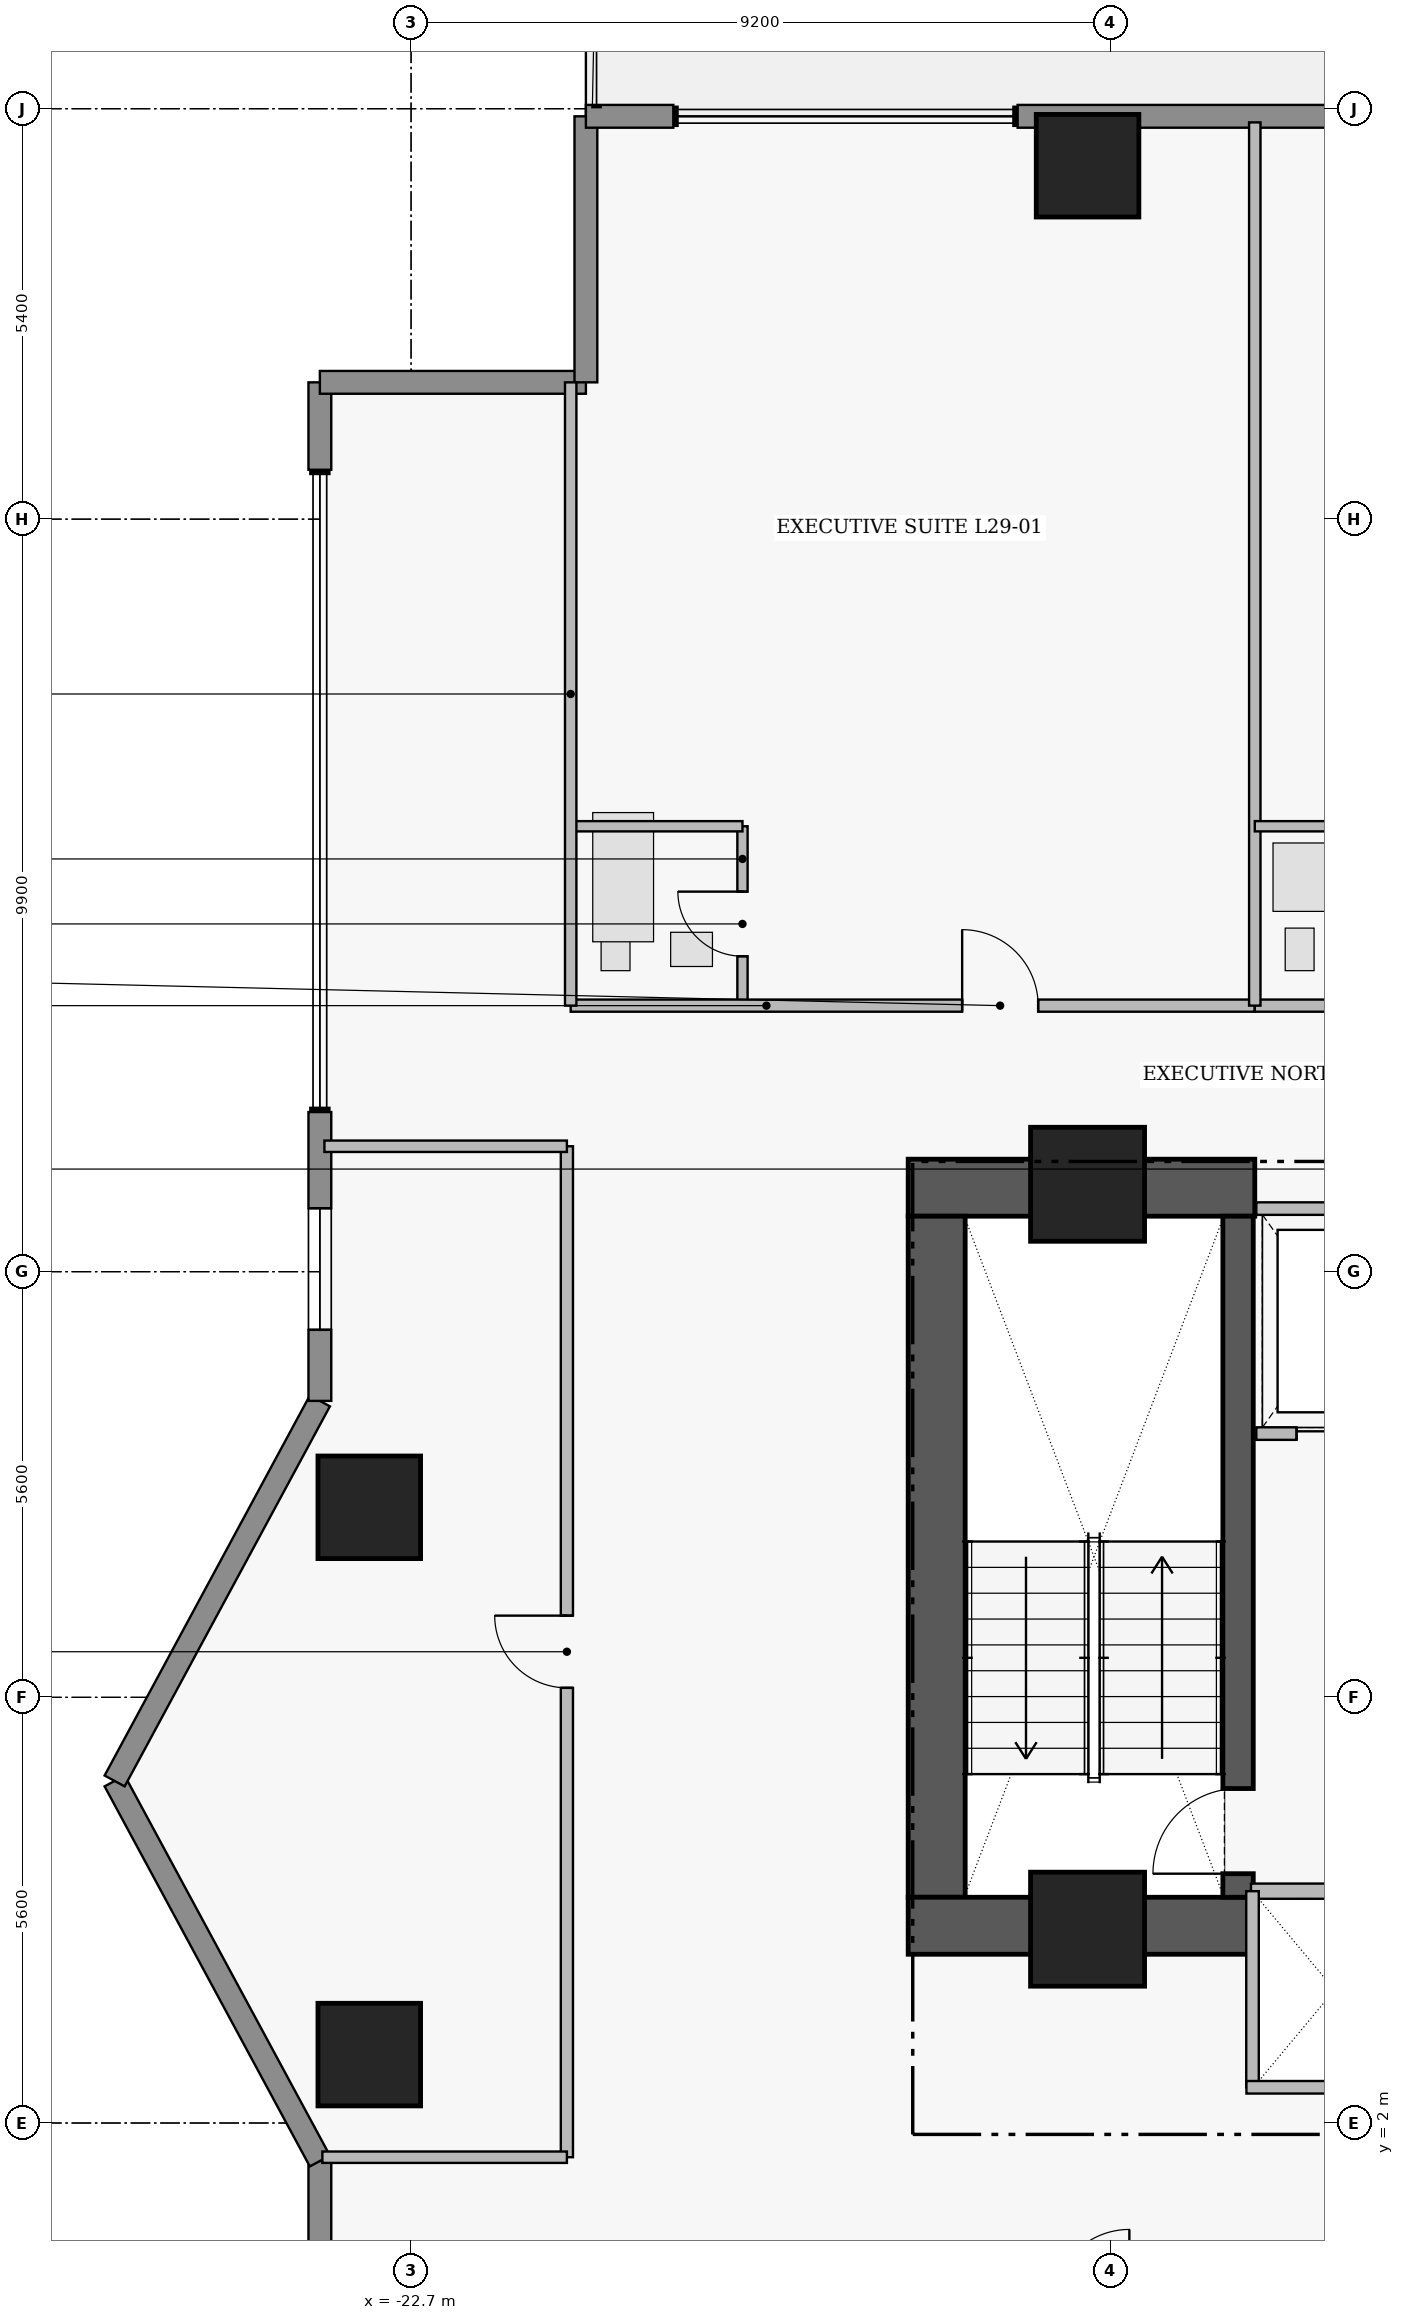
"""IFC4 building model, lengths in metres.
Left out: names, types, materials, properties, quantities, classifications, styles, units other than length and angle.
Written with IfcOpenShell. Run it as: python <this file> out.ifc"""

import sys

from ifc_helpers import new_model, si_unit, direction, frame, frame_2d, origin, origin_2d, place, context, subcontext, project, spatial, rectangle, extrude, element, fill, save


model = new_model("IFC4")
c1 = context("Model", 3, precision=1e-05, world=origin(), true_north=direction((0.0, 1.0)))
c2 = subcontext(c1, "Body", "Model", "MODEL_VIEW")
j1 = project(units=[si_unit("LENGTHUNIT", "METRE"), si_unit("PLANEANGLEUNIT", "RADIAN")], contexts=[c1])
p1 = place(None, origin())
s1 = spatial("IfcSite", under=j1, at=p1, CompositionType="ELEMENT")
p2 = place(p1, origin())
s2 = spatial("IfcBuilding", under=s1, at=p2, CompositionType="ELEMENT")
p3 = place(p2, frame((0.0, 0.0, 117.55)))
s3 = spatial("IfcBuildingStorey", under=s2, at=p3, CompositionType="ELEMENT", Elevation=117.55)
p4 = place(p3, frame((-16.16, 14.305, 0.0), z_axis=(0.0, 0.0, 1.0), x_axis=(1.0, 0.0, 0.0)))
e1 = element("IfcWall", 1, at=p4, inside=s3, PredefinedType="SHEAR", context=c2, shape_type="SweptSolid", body=[
    extrude(rectangle(XDim=4.56, YDim=0.75, at=frame_2d((2.28, 0.0))), origin(), (0.0, 0.0, 1.0), 3.46),
])
p5 = place(p3, frame((-15.785, 4.97, 0.0), z_axis=(0.0, 0.0, 1.0), x_axis=(0.0, 1.0, 0.0)))
e2 = element("IfcWall", 2, at=p5, inside=s3, PredefinedType="SHEAR", context=c2, shape_type="SweptSolid", body=[
    extrude(rectangle(XDim=8.96, YDim=0.75, at=frame_2d((4.48, 0.0))), origin(), (0.0, 0.0, 1.0), 3.46),
])
p6 = place(p3, frame((-16.16, 4.595, 0.0), z_axis=(0.0, 0.0, 1.0), x_axis=(1.0, 0.0, 0.0)))
e3 = element("IfcWall", 3, at=p6, inside=s3, PredefinedType="SHEAR", context=c2, shape_type="SweptSolid", body=[
    extrude(rectangle(XDim=4.56, YDim=0.75, at=frame_2d((2.28, 0.0))), origin(), (0.0, 0.0, 1.0), 3.46),
])
p7 = place(p3, frame((-11.82, 4.97, 0.0), z_axis=(0.0, 0.0, 1.0), x_axis=(0.0, 1.0, 0.0)))
e4 = element("IfcWall", 4, at=p7, inside=s3, PredefinedType="SHEAR", context=c2, shape_type="SweptSolid", body=[
    extrude(rectangle(XDim=8.96, YDim=0.4, at=frame_2d((4.48, 0.0))), origin(), (0.0, 0.0, 1.0), 3.46),
])
p8 = place(p7, frame((0.31, 0.0, 0.0)))
e5 = element("IfcOpeningElement", 5, at=p8, cuts=e4, PredefinedType="OPENING", context=c2, shape_type="SweptSolid", body=[
    extrude(rectangle(XDim=1.12, YDim=2.22, at=frame_2d((0.56, 1.11))), frame((0.0, 0.21, 0.0), z_axis=(0.0, -1.0, 0.0), x_axis=(1.0, 0.0, 0.0)), (0.0, 0.0, 1.0), 0.42),
])
for number, where, z_axis, x_axis in (
    (6, (-13.8, 14.35, 0.0), (0.0, 0.0, 1.0), (1.0, 0.0, 0.0)),
    (7, (-13.8, 4.55, 0.0), (0.0, 0.0, 1.0), (1.0, 0.0, 0.0)),
):
    element("IfcColumn", number, at=place(p3, frame(where, z_axis=z_axis, x_axis=x_axis)), inside=s3, PredefinedType="COLUMN", context=c2, shape_type="SweptSolid", body=[
        extrude(rectangle(XDim=1.5, YDim=1.5, at=origin_2d()), origin(), (0.0, 0.0, 1.0), 3.65),
    ])
for number, where, z_axis, x_axis in (
    (8, (-13.8, 27.75, 0.0), (0.0, 0.0, 1.0), (1.0, 0.0, 0.0)),
    (9, (-23.25, 2.9, 0.0), (0.0, 0.0, 1.0), (1.0, 0.0, 0.0)),
    (10, (-23.25, 10.1, 0.0), (0.0, 0.0, 1.0), (1.0, 0.0, 0.0)),
):
    element("IfcColumn", number, at=place(p3, frame(where, z_axis=z_axis, x_axis=x_axis)), inside=s3, PredefinedType="COLUMN", context=c2, shape_type="SweptSolid", body=[
        extrude(rectangle(XDim=1.35, YDim=1.35, at=origin_2d()), origin(), (0.0, 0.0, 1.0), 3.65),
    ])
p9 = place(p3, frame((-23.9, 0.35, 0.0), z_axis=(0.0, 0.0, 1.0), x_axis=(0.0, 1.0, 0.0)))
e11 = element("IfcWall", 11, at=p9, inside=s3, PredefinedType="STANDARD", context=c2, shape_type="SweptSolid", body=[
    extrude(rectangle(XDim=1.15, YDim=0.3, at=frame_2d((0.575, 0.0))), origin(), (0.0, 0.0, 1.0), 3.43),
])
for number, where, z_axis, x_axis in (
    (12, (-23.9, 1.5, 0.0), (0.0, 0.0, 1.0), (-0.475, 0.88, 0.0)),
    (13, (-26.6, 6.5, 0.0), (0.0, 0.0, 1.0), (0.475, 0.88, 0.0)),
):
    element("IfcWall", number, at=place(p3, frame(where, z_axis=z_axis, x_axis=x_axis)), inside=s3, PredefinedType="STANDARD", context=c2, shape_type="SweptSolid", body=[
        extrude(rectangle(XDim=5.683, YDim=0.3, at=frame_2d((2.841, 0.0))), origin(), (0.0, 0.0, 1.0), 3.43),
    ])
p10 = place(p3, frame((-23.9, 11.5, 0.0), z_axis=(0.0, 0.0, 1.0), x_axis=(0.0, 1.0, 0.0)))
e14 = element("IfcWall", 14, at=p10, inside=s3, PredefinedType="STANDARD", context=c2, shape_type="SweptSolid", body=[
    extrude(rectangle(XDim=3.8, YDim=0.3, at=frame_2d((1.9, 0.0))), origin(), (0.0, 0.0, 1.0), 3.43),
])
p11 = place(p10, frame((0.935, 0.0, 0.85)))
e15 = element("IfcOpeningElement", 15, at=p11, cuts=e14, PredefinedType="OPENING", context=c2, shape_type="SweptSolid", body=[
    extrude(rectangle(XDim=1.6, YDim=1.8, at=frame_2d((0.8, 0.9))), frame((0.0, 0.16, 0.0), z_axis=(0.0, -1.0, 0.0), x_axis=(1.0, 0.0, 0.0)), (0.0, 0.0, 1.0), 0.32),
])
p12 = place(p3, frame((-23.9, 23.75, 0.0), z_axis=(0.0, 0.0, 1.0), x_axis=(0.0, 1.0, 0.0)))
e16 = element("IfcWall", 16, at=p12, inside=s3, PredefinedType="STANDARD", context=c2, shape_type="SweptSolid", body=[
    extrude(rectangle(XDim=1.15, YDim=0.3, at=frame_2d((0.575, 0.0))), origin(), (0.0, 0.0, 1.0), 3.43),
])
for number, where, z_axis, x_axis in (
    (17, (-23.9, 24.9, 0.0), (0.0, 0.0, 1.0), (1.0, 0.0, 0.0)),
    (18, (-20.4, 24.9, 0.0), (0.0, 0.0, 1.0), (0.0, 1.0, 0.0)),
):
    element("IfcWall", number, at=place(p3, frame(where, z_axis=z_axis, x_axis=x_axis)), inside=s3, PredefinedType="STANDARD", context=c2, shape_type="SweptSolid", body=[
        extrude(rectangle(XDim=3.5, YDim=0.3, at=frame_2d((1.75, 0.0))), origin(), (0.0, 0.0, 1.0), 3.43),
    ])
p13 = place(p3, frame((-20.4, 28.4, 0.0), z_axis=(0.0, 0.0, 1.0), x_axis=(1.0, 0.0, 0.0)))
e19 = element("IfcWall", 19, at=p13, inside=s3, PredefinedType="STANDARD", context=c2, shape_type="SweptSolid", body=[
    extrude(rectangle(XDim=1.15, YDim=0.3, at=frame_2d((0.575, 0.0))), origin(), (0.0, 0.0, 1.0), 3.43),
])
p14 = place(p3, frame((-14.72, 28.4, 0.0), z_axis=(0.0, 0.0, 1.0), x_axis=(1.0, 0.0, 0.0)))
e20 = element("IfcWall", 20, at=p14, inside=s3, PredefinedType="STANDARD", context=c2, shape_type="SweptSolid", body=[
    extrude(rectangle(XDim=11.04, YDim=0.3, at=frame_2d((5.52, 0.0))), origin(), (0.0, 0.0, 1.0), 3.43),
])
p15 = place(p14, frame((4.98, 0.0, 0.85)))
e21 = element("IfcOpeningElement", 21, at=p15, cuts=e20, PredefinedType="OPENING", context=c2, shape_type="SweptSolid", body=[
    extrude(rectangle(XDim=1.6, YDim=1.8, at=frame_2d((0.8, 0.9))), frame((0.0, 0.16, 0.0), z_axis=(0.0, -1.0, 0.0), x_axis=(1.0, 0.0, 0.0)), (0.0, 0.0, 1.0), 0.32),
])
p16 = place(p14, frame((7.325, 0.0, 0.85)))
e22 = element("IfcOpeningElement", 22, at=p16, cuts=e20, PredefinedType="OPENING", context=c2, shape_type="SweptSolid", body=[
    extrude(rectangle(XDim=1.6, YDim=1.8, at=frame_2d((0.8, 0.9))), frame((0.0, 0.16, 0.0), z_axis=(0.0, -1.0, 0.0), x_axis=(1.0, 0.0, 0.0)), (0.0, 0.0, 1.0), 0.32),
])
p17 = place(p3, frame((-11.58, 11.07, 0.0), z_axis=(0.0, 0.0, 1.0), x_axis=(1.0, 0.0, 0.0)))
e23 = element("IfcWall", 23, at=p17, inside=s3, PredefinedType="PARTITIONING", context=c2, shape_type="SweptSolid", body=[
    extrude(rectangle(XDim=2.16, YDim=0.165, at=frame_2d((1.08, 0.0))), origin(), (0.0, 0.0, 1.0), 3.43),
])
p18 = place(p17, frame((0.53, 0.0, 0.0)))
e24 = element("IfcOpeningElement", 24, at=p18, cuts=e23, PredefinedType="OPENING", context=c2, shape_type="SweptSolid", body=[
    extrude(rectangle(XDim=1.15, YDim=2.25, at=frame_2d((0.575, 1.125))), frame((0.0, 0.093, 0.0), z_axis=(0.0, -1.0, 0.0), x_axis=(1.0, 0.0, 0.0)), (0.0, 0.0, 1.0), 0.185),
])
p19 = place(p3, frame((-18.34, 16.7, 0.0), z_axis=(0.0, 0.0, 1.0), x_axis=(0.0, 1.0, 0.0)))
e25 = element("IfcWall", 25, at=p19, inside=s3, PredefinedType="PLUMBINGWALL", context=c2, shape_type="SweptSolid", body=[
    extrude(rectangle(XDim=2.36, YDim=0.135, at=frame_2d((1.18, 0.0))), origin(), (0.0, 0.0, 1.0), 3.43),
])
p20 = place(p19, frame((0.65, 0.0, 0.0)))
e26 = element("IfcOpeningElement", 26, at=p20, cuts=e25, PredefinedType="OPENING", context=c2, shape_type="SweptSolid", body=[
    extrude(rectangle(XDim=0.85, YDim=2.1, at=frame_2d((0.425, 1.05))), frame((0.0, 0.077, 0.0), z_axis=(0.0, -1.0, 0.0), x_axis=(1.0, 0.0, 0.0)), (0.0, 0.0, 1.0), 0.155),
])
p21 = place(p3, frame((-20.6, 16.7, 0.0), z_axis=(0.0, 0.0, 1.0), x_axis=(1.0, 0.0, 0.0)))
e27 = element("IfcWall", 27, at=p21, inside=s3, PredefinedType="PARTITIONING", context=c2, shape_type="SweptSolid", body=[
    extrude(rectangle(XDim=9.0, YDim=0.16, at=frame_2d((4.5, 0.0))), origin(), (0.0, 0.0, 1.0), 2.973),
])
p22 = place(p21, frame((5.15, 0.0, 0.0)))
e28 = element("IfcOpeningElement", 28, at=p22, cuts=e27, PredefinedType="OPENING", context=c2, shape_type="SweptSolid", body=[
    extrude(rectangle(XDim=1.0, YDim=2.15, at=frame_2d((0.5, 1.075))), frame((0.0, 0.09, 0.0), z_axis=(0.0, -1.0, 0.0), x_axis=(1.0, 0.0, 0.0)), (0.0, 0.0, 1.0), 0.18),
])
p23 = place(p3, frame((-11.6, 16.7, 0.0), z_axis=(0.0, 0.0, 1.0), x_axis=(1.0, 0.0, 0.0)))
e29 = element("IfcWall", 29, at=p23, inside=s3, PredefinedType="PARTITIONING", context=c2, shape_type="SweptSolid", body=[
    extrude(rectangle(XDim=7.0, YDim=0.16, at=frame_2d((3.5, 0.0))), origin(), (0.0, 0.0, 1.0), 2.973),
])
p24 = place(p23, frame((4.15, 0.0, 0.0)))
e30 = element("IfcOpeningElement", 30, at=p24, cuts=e29, PredefinedType="OPENING", context=c2, shape_type="SweptSolid", body=[
    extrude(rectangle(XDim=1.0, YDim=2.15, at=frame_2d((0.5, 1.075))), frame((0.0, 0.09, 0.0), z_axis=(0.0, -1.0, 0.0), x_axis=(1.0, 0.0, 0.0)), (0.0, 0.0, 1.0), 0.18),
])
p25 = place(p3, frame((-20.65, 1.55, 0.0), z_axis=(0.0, 0.0, 1.0), x_axis=(0.0, 1.0, 0.0)))
e31 = element("IfcWall", 31, at=p25, inside=s3, PredefinedType="PARTITIONING", context=c2, shape_type="SweptSolid", body=[
    extrude(rectangle(XDim=13.3, YDim=0.16, at=frame_2d((6.65, 0.0))), origin(), (0.0, 0.0, 1.0), 3.43),
])
p26 = place(p25, frame((6.175, 0.0, 0.0)))
e32 = element("IfcOpeningElement", 32, at=p26, cuts=e31, PredefinedType="OPENING", context=c2, shape_type="SweptSolid", body=[
    extrude(rectangle(XDim=0.95, YDim=2.15, at=frame_2d((0.475, 1.075))), frame((0.0, 0.09, 0.0), z_axis=(0.0, -1.0, 0.0), x_axis=(1.0, 0.0, 0.0)), (0.0, 0.0, 1.0), 0.18),
])
p27 = place(p3, frame((-11.65, 5.05, 0.0), z_axis=(0.0, 0.0, 1.0), x_axis=(1.0, 0.0, 0.0)))
e33 = element("IfcWall", 33, at=p27, inside=s3, PredefinedType="PARTITIONING", context=c2, shape_type="SweptSolid", body=[
    extrude(rectangle(XDim=2.85, YDim=0.2, at=frame_2d((1.425, 0.0))), origin(), (0.0, 0.0, 1.0), 3.43),
])
p28 = place(p3, frame((-11.58, 14.03, 0.0), z_axis=(0.0, 0.0, 1.0), x_axis=(1.0, 0.0, 0.0)))
e34 = element("IfcWall", 34, at=p28, inside=s3, PredefinedType="PARTITIONING", context=c2, shape_type="SweptSolid", body=[
    extrude(rectangle(XDim=2.16, YDim=0.165, at=frame_2d((1.08, 0.0))), origin(), (0.0, 0.0, 1.0), 3.43),
])
p29 = place(p3, frame((-11.63, 2.47, 0.0), z_axis=(0.0, 0.0, 1.0), x_axis=(0.0, 1.0, 0.0)))
e35 = element("IfcWall", 35, at=p29, inside=s3, PredefinedType="PARTITIONING", context=c2, shape_type="SweptSolid", body=[
    extrude(rectangle(XDim=2.58, YDim=0.165, at=frame_2d((1.29, 0.0))), origin(), (0.0, 0.0, 1.0), 3.43),
])
p30 = place(p3, frame((-11.71, 2.47, 0.0), z_axis=(0.0, 0.0, 1.0), x_axis=(1.0, 0.0, 0.0)))
e36 = element("IfcWall", 36, at=p30, inside=s3, PredefinedType="PARTITIONING", context=c2, shape_type="SweptSolid", body=[
    extrude(rectangle(XDim=2.31, YDim=0.165, at=frame_2d((1.155, 0.0))), origin(), (0.0, 0.0, 1.0), 2.03),
])
p31 = place(p3, frame((-20.6, 19.06, 0.0), z_axis=(0.0, 0.0, 1.0), x_axis=(1.0, 0.0, 0.0)))
e37 = element("IfcWall", 37, at=p31, inside=s3, PredefinedType="PLUMBINGWALL", context=c2, shape_type="SweptSolid", body=[
    extrude(rectangle(XDim=2.26, YDim=0.135, at=frame_2d((1.13, 0.0))), origin(), (0.0, 0.0, 1.0), 3.43),
])
p32 = place(p3, frame((-20.6, 16.7, 0.0), z_axis=(0.0, 0.0, 1.0), x_axis=(0.0, 1.0, 0.0)))
e38 = element("IfcWall", 38, at=p32, inside=s3, PredefinedType="PARTITIONING", context=c2, shape_type="SweptSolid", body=[
    extrude(rectangle(XDim=8.2, YDim=0.15, at=frame_2d((4.1, 0.0))), origin(), (0.0, 0.0, 1.0), 3.43),
])
p33 = place(p3, frame((-11.6, 16.7, 0.0), z_axis=(0.0, 0.0, 1.0), x_axis=(0.0, 1.0, 0.0)))
e39 = element("IfcWall", 39, at=p33, inside=s3, PredefinedType="PARTITIONING", context=c2, shape_type="SweptSolid", body=[
    extrude(rectangle(XDim=11.62, YDim=0.15, at=frame_2d((5.81, 0.0))), origin(), (0.0, 0.0, 1.0), 3.43),
])
p34 = place(p3, frame((-11.6, 19.06, 0.0), z_axis=(0.0, 0.0, 1.0), x_axis=(1.0, 0.0, 0.0)))
e40 = element("IfcWall", 40, at=p34, inside=s3, PredefinedType="PLUMBINGWALL", context=c2, shape_type="SweptSolid", body=[
    extrude(rectangle(XDim=2.26, YDim=0.135, at=frame_2d((1.13, 0.0))), origin(), (0.0, 0.0, 1.0), 2.973),
])
p35 = place(p3, frame((-23.867, 1.55, 0.0), z_axis=(0.0, 0.0, 1.0), x_axis=(1.0, 0.0, 0.0)))
e41 = element("IfcWall", 41, at=p35, inside=s3, PredefinedType="PARTITIONING", context=c2, shape_type="SweptSolid", body=[
    extrude(rectangle(XDim=3.217, YDim=0.15, at=frame_2d((1.608, 0.0))), origin(), (0.0, 0.0, 1.0), 3.43),
])
p36 = place(p3, frame((-23.84, 14.85, 0.0), z_axis=(0.0, 0.0, 1.0), x_axis=(1.0, 0.0, 0.0)))
e42 = element("IfcWall", 42, at=p36, inside=s3, PredefinedType="PARTITIONING", context=c2, shape_type="SweptSolid", body=[
    extrude(rectangle(XDim=3.19, YDim=0.15, at=frame_2d((1.595, 0.0))), origin(), (0.0, 0.0, 1.0), 3.43),
])
p37 = place(p11, origin())
e43 = element("IfcWindow", 43, at=p37, inside=s3, PartitioningType="SINGLE_PANEL", PredefinedType="WINDOW", context=c2, shape_type="SweptSolid", body=[
    extrude(rectangle(XDim=1.6, YDim=1.8, at=frame_2d((0.8, 0.9))), frame((0.0, 0.03, 0.0), z_axis=(0.0, -1.0, 0.0), x_axis=(1.0, 0.0, 0.0)), (0.0, 0.0, 1.0), 0.06),
])
fill(e15, e43)
p38 = place(p8, origin())
e44 = element("IfcDoor", 44, at=p38, inside=s3, OperationType="SINGLE_SWING_LEFT", PredefinedType="DOOR", context=c2, shape_type="SweptSolid", body=[
    extrude(rectangle(XDim=1.12, YDim=2.22, at=frame_2d((0.56, 1.11))), frame((0.0, 0.025, 0.0), z_axis=(0.0, -1.0, 0.0), x_axis=(1.0, 0.0, 0.0)), (0.0, 0.0, 1.0), 0.05),
])
fill(e5, e44)
p39 = place(p18, origin())
e45 = element("IfcDoor", 45, at=p39, inside=s3, OperationType="SLIDING_TO_LEFT", PredefinedType="DOOR", context=c2, shape_type="SweptSolid", body=[
    extrude(rectangle(XDim=1.15, YDim=2.25, at=frame_2d((0.575, 1.125))), frame((0.0, 0.025, 0.0), z_axis=(0.0, -1.0, 0.0), x_axis=(1.0, 0.0, 0.0)), (0.0, 0.0, 1.0), 0.05),
])
fill(e24, e45)
p40 = place(p20, origin())
e46 = element("IfcDoor", 46, at=p40, inside=s3, OperationType="SINGLE_SWING_RIGHT", PredefinedType="DOOR", context=c2, shape_type="SweptSolid", body=[
    extrude(rectangle(XDim=0.85, YDim=2.1, at=frame_2d((0.425, 1.05))), frame((0.0, 0.025, 0.0), z_axis=(0.0, -1.0, 0.0), x_axis=(1.0, 0.0, 0.0)), (0.0, 0.0, 1.0), 0.05),
])
fill(e26, e46)
p41 = place(p22, origin())
e47 = element("IfcDoor", 47, at=p41, inside=s3, OperationType="SINGLE_SWING_LEFT", PredefinedType="DOOR", context=c2, shape_type="SweptSolid", body=[
    extrude(rectangle(XDim=1.0, YDim=2.15, at=frame_2d((0.5, 1.075))), frame((0.0, 0.025, 0.0), z_axis=(0.0, -1.0, 0.0), x_axis=(1.0, 0.0, 0.0)), (0.0, 0.0, 1.0), 0.05),
])
fill(e28, e47)
p42 = place(p26, origin())
e48 = element("IfcDoor", 48, at=p42, inside=s3, OperationType="SINGLE_SWING_RIGHT", PredefinedType="DOOR", context=c2, shape_type="SweptSolid", body=[
    extrude(rectangle(XDim=0.95, YDim=2.15, at=frame_2d((0.475, 1.075))), frame((0.0, 0.025, 0.0), z_axis=(0.0, -1.0, 0.0), x_axis=(1.0, 0.0, 0.0)), (0.0, 0.0, 1.0), 0.05),
])
fill(e32, e48)
save(model, sys.argv[1])
